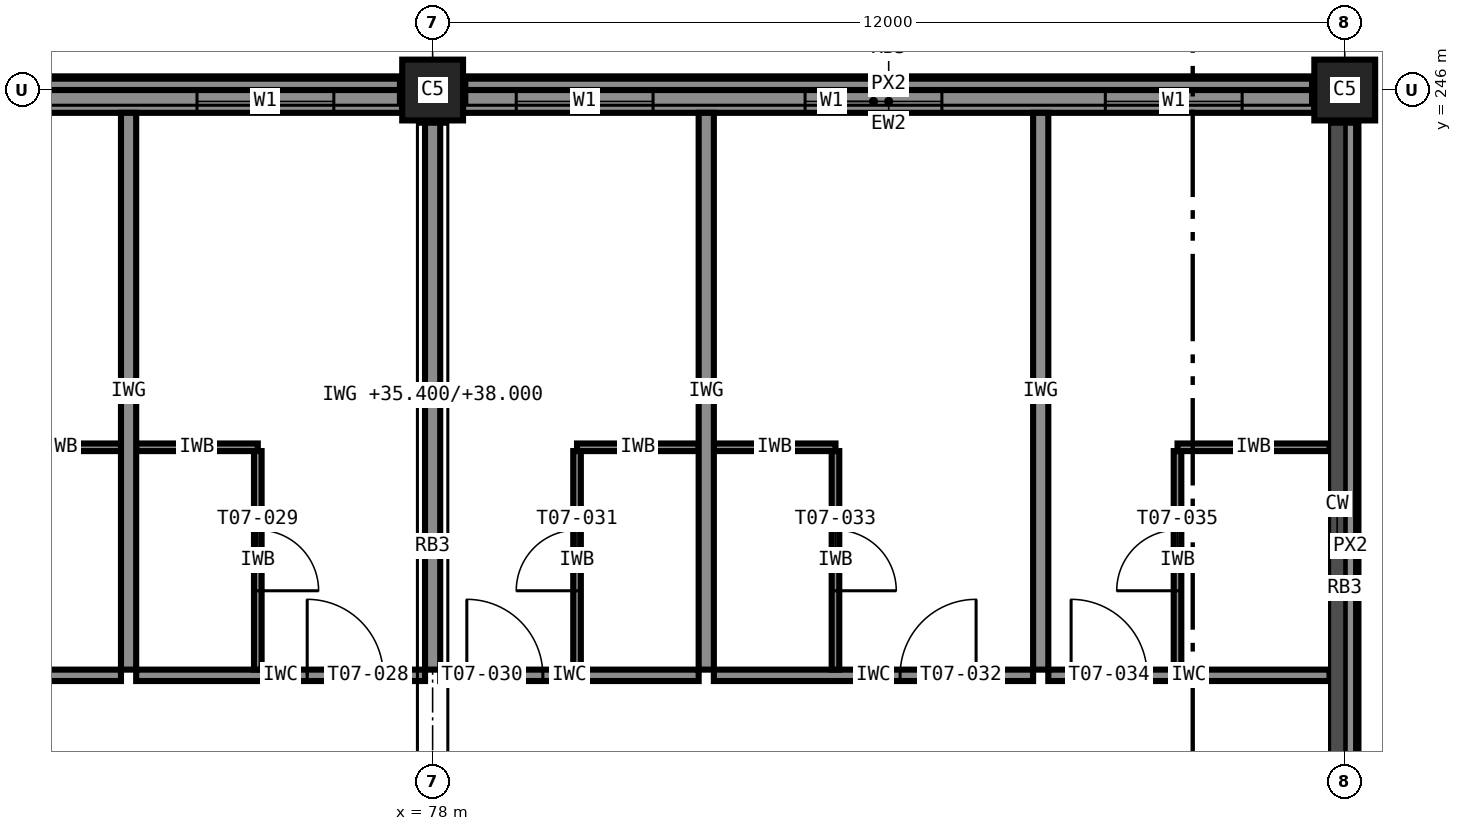
"""IFC4 building model, lengths in metres.
Left out: names, types, materials, properties, quantities, classifications, styles, units other than length and angle.
Written with IfcOpenShell. Run it as: python <this file> out.ifc"""

import sys

from ifc_helpers import new_model, si_unit, direction, frame, frame_2d, origin, origin_2d, place, context, subcontext, project, spatial, rectangle, extrude, element, fill, save


model = new_model("IFC4")
c1 = context("Model", 3, precision=1e-05, world=origin(), true_north=direction((0.0, 1.0)))
c2 = subcontext(c1, "Body", "Model", "MODEL_VIEW")
j1 = project(units=[si_unit("LENGTHUNIT", "METRE"), si_unit("PLANEANGLEUNIT", "RADIAN")], contexts=[c1])
p1 = place(None, origin())
s1 = spatial("IfcSite", under=j1, at=p1, CompositionType="ELEMENT")
p2 = place(p1, origin())
s2 = spatial("IfcBuilding", under=s1, at=p2, CompositionType="ELEMENT")
p3 = place(p2, frame((0.0, 0.0, 35.4)))
s3 = spatial("IfcBuildingStorey", under=s2, at=p3, CompositionType="ELEMENT", Elevation=35.4)
for number, where, z_axis, x_axis in (
    (1, (78.0, 246.0, 0.0), (0.0, 0.0, 1.0), (1.0, 0.0, 0.0)),
    (2, (90.0, 246.0, 0.0), (0.0, 0.0, 1.0), (1.0, 0.0, 0.0)),
):
    element("IfcColumn", number, at=place(p3, frame(where, z_axis=z_axis, x_axis=x_axis)), inside=s3, PredefinedType="COLUMN", context=c2, shape_type="SweptSolid", body=[
        extrude(rectangle(XDim=0.8, YDim=0.8, at=origin_2d()), origin(), (0.0, 0.0, 1.0), 3.6),
    ])
p4 = place(p3, frame((90.075, 234.4, 3.4), z_axis=(0.0, 0.0, 1.0), x_axis=(0.0, 1.0, 0.0)))
e3 = element("IfcWall", 3, at=p4, inside=s3, PredefinedType="STANDARD", context=c2, shape_type="SweptSolid", body=[
    extrude(rectangle(XDim=11.2, YDim=0.15, at=frame_2d((5.6, 0.0))), origin(), (0.0, 0.0, 1.0), 0.2),
])
p5 = place(p3, frame((89.6, 245.85, 0.0), z_axis=(0.0, 0.0, 1.0), x_axis=(-1.0, 0.0, 0.0)))
e4 = element("IfcWall", 4, at=p5, inside=s3, PredefinedType="STANDARD", context=c2, shape_type="SweptSolid", body=[
    extrude(rectangle(XDim=11.2, YDim=0.3, at=frame_2d((5.6, 0.0))), origin(), (0.0, 0.0, 1.0), 2.6),
])
p6 = place(p5, frame((8.7, 0.0, 0.85)))
e5 = element("IfcOpeningElement", 5, at=p6, cuts=e4, PredefinedType="OPENING", context=c2, shape_type="SweptSolid", body=[
    extrude(rectangle(XDim=1.8, YDim=1.75, at=frame_2d((0.9, 0.875))), frame((0.0, 0.16, 0.0), z_axis=(0.0, -1.0, 0.0), x_axis=(1.0, 0.0, 0.0)), (0.0, 0.0, 1.0), 0.32),
])
p7 = place(p5, frame((4.9, 0.0, 0.85)))
e6 = element("IfcOpeningElement", 6, at=p7, cuts=e4, PredefinedType="OPENING", context=c2, shape_type="SweptSolid", body=[
    extrude(rectangle(XDim=1.8, YDim=1.75, at=frame_2d((0.9, 0.875))), frame((0.0, 0.16, 0.0), z_axis=(0.0, -1.0, 0.0), x_axis=(1.0, 0.0, 0.0)), (0.0, 0.0, 1.0), 0.32),
])
p8 = place(p5, frame((0.95, 0.0, 0.85)))
e7 = element("IfcOpeningElement", 7, at=p8, cuts=e4, PredefinedType="OPENING", context=c2, shape_type="SweptSolid", body=[
    extrude(rectangle(XDim=1.8, YDim=1.75, at=frame_2d((0.9, 0.875))), frame((0.0, 0.16, 0.0), z_axis=(0.0, -1.0, 0.0), x_axis=(1.0, 0.0, 0.0)), (0.0, 0.0, 1.0), 0.32),
])
p9 = place(p3, frame((77.6, 245.85, 0.0), z_axis=(0.0, 0.0, 1.0), x_axis=(-1.0, 0.0, 0.0)))
e8 = element("IfcWall", 8, at=p9, inside=s3, PredefinedType="STANDARD", context=c2, shape_type="SweptSolid", body=[
    extrude(rectangle(XDim=11.2, YDim=0.3, at=frame_2d((5.6, 0.0))), origin(), (0.0, 0.0, 1.0), 2.6),
])
p10 = place(p9, frame((8.5, 0.0, 0.85)))
e9 = element("IfcOpeningElement", 9, at=p10, cuts=e8, PredefinedType="OPENING", context=c2, shape_type="SweptSolid", body=[
    extrude(rectangle(XDim=1.8, YDim=1.75, at=frame_2d((0.9, 0.875))), frame((0.0, 0.16, 0.0), z_axis=(0.0, -1.0, 0.0), x_axis=(1.0, 0.0, 0.0)), (0.0, 0.0, 1.0), 0.32),
])
p11 = place(p9, frame((4.7, 0.0, 0.85)))
e10 = element("IfcOpeningElement", 10, at=p11, cuts=e8, PredefinedType="OPENING", context=c2, shape_type="SweptSolid", body=[
    extrude(rectangle(XDim=1.8, YDim=1.75, at=frame_2d((0.9, 0.875))), frame((0.0, 0.16, 0.0), z_axis=(0.0, -1.0, 0.0), x_axis=(1.0, 0.0, 0.0)), (0.0, 0.0, 1.0), 0.32),
])
p12 = place(p9, frame((0.9, 0.0, 0.85)))
e11 = element("IfcOpeningElement", 11, at=p12, cuts=e8, PredefinedType="OPENING", context=c2, shape_type="SweptSolid", body=[
    extrude(rectangle(XDim=1.8, YDim=1.75, at=frame_2d((0.9, 0.875))), frame((0.0, 0.16, 0.0), z_axis=(0.0, -1.0, 0.0), x_axis=(1.0, 0.0, 0.0)), (0.0, 0.0, 1.0), 0.32),
])
for number, where, z_axis, x_axis in (
    (12, (89.6, 246.075, 3.4), (0.0, 0.0, 1.0), (-1.0, 0.0, 0.0)),
    (13, (77.6, 246.075, 3.4), (0.0, 0.0, 1.0), (-1.0, 0.0, 0.0)),
):
    element("IfcWall", number, at=place(p3, frame(where, z_axis=z_axis, x_axis=x_axis)), inside=s3, PredefinedType="STANDARD", context=c2, shape_type="SweptSolid", body=[
        extrude(rectangle(XDim=11.2, YDim=0.15, at=frame_2d((5.6, 0.0))), origin(), (0.0, 0.0, 1.0), 0.2),
    ])
p13 = place(p3, frame((70.1, 238.3, 0.0), z_axis=(0.0, 0.0, 1.0), x_axis=(1.0, 0.0, 0.0)))
e14 = element("IfcWall", 14, at=p13, inside=s3, PredefinedType="PARTITIONING", context=c2, shape_type="SweptSolid", body=[
    extrude(rectangle(XDim=3.8, YDim=0.15, at=frame_2d((1.9, 0.0))), origin(), (0.0, 0.0, 1.0), 3.4),
])
p14 = place(p13, frame((0.55, 0.0, 0.0)))
e15 = element("IfcOpeningElement", 15, at=p14, cuts=e14, PredefinedType="OPENING", context=c2, shape_type="SweptSolid", body=[
    extrude(rectangle(XDim=1.0, YDim=2.1, at=frame_2d((0.5, 1.05))), frame((0.0, 0.085, 0.0), z_axis=(0.0, -1.0, 0.0), x_axis=(1.0, 0.0, 0.0)), (0.0, 0.0, 1.0), 0.17),
])
p15 = place(p3, frame((72.3, 241.3, 0.0), z_axis=(0.0, 0.0, 1.0), x_axis=(1.0, 0.0, 0.0)))
e16 = element("IfcWall", 16, at=p15, inside=s3, PredefinedType="PARTITIONING", context=c2, shape_type="SweptSolid", body=[
    extrude(rectangle(XDim=1.6, YDim=0.1, at=frame_2d((0.8, 0.0))), origin(), (0.0, 0.0, 1.0), 3.4),
])
p16 = place(p3, frame((74.1, 238.3, 0.0), z_axis=(0.0, 0.0, 1.0), x_axis=(1.0, 0.0, 0.0)))
e17 = element("IfcWall", 17, at=p16, inside=s3, PredefinedType="PARTITIONING", context=c2, shape_type="SweptSolid", body=[
    extrude(rectangle(XDim=3.8, YDim=0.15, at=frame_2d((1.9, 0.0))), origin(), (0.0, 0.0, 1.0), 3.4),
])
p17 = place(p16, frame((2.25, 0.0, 0.0)))
e18 = element("IfcOpeningElement", 18, at=p17, cuts=e17, PredefinedType="OPENING", context=c2, shape_type="SweptSolid", body=[
    extrude(rectangle(XDim=1.0, YDim=2.1, at=frame_2d((0.5, 1.05))), frame((0.0, 0.085, 0.0), z_axis=(0.0, -1.0, 0.0), x_axis=(1.0, 0.0, 0.0)), (0.0, 0.0, 1.0), 0.17),
])
p18 = place(p3, frame((74.1, 241.3, 0.0), z_axis=(0.0, 0.0, 1.0), x_axis=(1.0, 0.0, 0.0)))
e19 = element("IfcWall", 19, at=p18, inside=s3, PredefinedType="PARTITIONING", context=c2, shape_type="SweptSolid", body=[
    extrude(rectangle(XDim=1.6, YDim=0.1, at=frame_2d((0.8, 0.0))), origin(), (0.0, 0.0, 1.0), 3.4),
])
p19 = place(p3, frame((75.7, 241.25, 0.0), z_axis=(0.0, 0.0, 1.0), x_axis=(0.0, -1.0, 0.0)))
e20 = element("IfcWall", 20, at=p19, inside=s3, PredefinedType="PARTITIONING", context=c2, shape_type="SweptSolid", body=[
    extrude(rectangle(XDim=2.875, YDim=0.1, at=frame_2d((1.438, 0.0))), origin(), (0.0, 0.0, 1.0), 3.4),
])
p20 = place(p19, frame((1.038, 0.0, 0.0)))
e21 = element("IfcOpeningElement", 21, at=p20, cuts=e20, PredefinedType="OPENING", context=c2, shape_type="SweptSolid", body=[
    extrude(rectangle(XDim=0.8, YDim=2.1, at=frame_2d((0.4, 1.05))), frame((0.0, 0.06, 0.0), z_axis=(0.0, -1.0, 0.0), x_axis=(1.0, 0.0, 0.0)), (0.0, 0.0, 1.0), 0.12),
])
p21 = place(p3, frame((78.1, 238.3, 0.0), z_axis=(0.0, 0.0, 1.0), x_axis=(1.0, 0.0, 0.0)))
e22 = element("IfcWall", 22, at=p21, inside=s3, PredefinedType="PARTITIONING", context=c2, shape_type="SweptSolid", body=[
    extrude(rectangle(XDim=3.4, YDim=0.15, at=frame_2d((1.7, 0.0))), origin(), (0.0, 0.0, 1.0), 3.4),
])
p22 = place(p21, frame((0.35, 0.0, 0.0)))
e23 = element("IfcOpeningElement", 23, at=p22, cuts=e22, PredefinedType="OPENING", context=c2, shape_type="SweptSolid", body=[
    extrude(rectangle(XDim=1.0, YDim=2.1, at=frame_2d((0.5, 1.05))), frame((0.0, 0.085, 0.0), z_axis=(0.0, -1.0, 0.0), x_axis=(1.0, 0.0, 0.0)), (0.0, 0.0, 1.0), 0.17),
])
p23 = place(p3, frame((79.9, 241.3, 0.0), z_axis=(0.0, 0.0, 1.0), x_axis=(1.0, 0.0, 0.0)))
e24 = element("IfcWall", 24, at=p23, inside=s3, PredefinedType="PARTITIONING", context=c2, shape_type="SweptSolid", body=[
    extrude(rectangle(XDim=1.6, YDim=0.1, at=frame_2d((0.8, 0.0))), origin(), (0.0, 0.0, 1.0), 3.4),
])
p24 = place(p3, frame((79.9, 238.375, 0.0), z_axis=(0.0, 0.0, 1.0), x_axis=(0.0, 1.0, 0.0)))
e25 = element("IfcWall", 25, at=p24, inside=s3, PredefinedType="PARTITIONING", context=c2, shape_type="SweptSolid", body=[
    extrude(rectangle(XDim=2.875, YDim=0.1, at=frame_2d((1.438, 0.0))), origin(), (0.0, 0.0, 1.0), 3.4),
])
p25 = place(p24, frame((1.038, 0.0, 0.0)))
e26 = element("IfcOpeningElement", 26, at=p25, cuts=e25, PredefinedType="OPENING", context=c2, shape_type="SweptSolid", body=[
    extrude(rectangle(XDim=0.8, YDim=2.1, at=frame_2d((0.4, 1.05))), frame((0.0, 0.06, 0.0), z_axis=(0.0, -1.0, 0.0), x_axis=(1.0, 0.0, 0.0)), (0.0, 0.0, 1.0), 0.12),
])
p26 = place(p3, frame((81.7, 238.3, 0.0), z_axis=(0.0, 0.0, 1.0), x_axis=(1.0, 0.0, 0.0)))
e27 = element("IfcWall", 27, at=p26, inside=s3, PredefinedType="PARTITIONING", context=c2, shape_type="SweptSolid", body=[
    extrude(rectangle(XDim=4.2, YDim=0.15, at=frame_2d((2.1, 0.0))), origin(), (0.0, 0.0, 1.0), 3.4),
])
p27 = place(p26, frame((2.45, 0.0, 0.0)))
e28 = element("IfcOpeningElement", 28, at=p27, cuts=e27, PredefinedType="OPENING", context=c2, shape_type="SweptSolid", body=[
    extrude(rectangle(XDim=1.0, YDim=2.1, at=frame_2d((0.5, 1.05))), frame((0.0, 0.085, 0.0), z_axis=(0.0, -1.0, 0.0), x_axis=(1.0, 0.0, 0.0)), (0.0, 0.0, 1.0), 0.17),
])
p28 = place(p3, frame((81.7, 241.3, 0.0), z_axis=(0.0, 0.0, 1.0), x_axis=(1.0, 0.0, 0.0)))
e29 = element("IfcWall", 29, at=p28, inside=s3, PredefinedType="PARTITIONING", context=c2, shape_type="SweptSolid", body=[
    extrude(rectangle(XDim=1.6, YDim=0.1, at=frame_2d((0.8, 0.0))), origin(), (0.0, 0.0, 1.0), 3.4),
])
p29 = place(p3, frame((83.3, 241.25, 0.0), z_axis=(0.0, 0.0, 1.0), x_axis=(0.0, -1.0, 0.0)))
e30 = element("IfcWall", 30, at=p29, inside=s3, PredefinedType="PARTITIONING", context=c2, shape_type="SweptSolid", body=[
    extrude(rectangle(XDim=2.875, YDim=0.1, at=frame_2d((1.438, 0.0))), origin(), (0.0, 0.0, 1.0), 3.4),
])
p30 = place(p29, frame((1.038, 0.0, 0.0)))
e31 = element("IfcOpeningElement", 31, at=p30, cuts=e30, PredefinedType="OPENING", context=c2, shape_type="SweptSolid", body=[
    extrude(rectangle(XDim=0.8, YDim=2.1, at=frame_2d((0.4, 1.05))), frame((0.0, 0.06, 0.0), z_axis=(0.0, -1.0, 0.0), x_axis=(1.0, 0.0, 0.0)), (0.0, 0.0, 1.0), 0.12),
])
p31 = place(p3, frame((86.1, 238.3, 0.0), z_axis=(0.0, 0.0, 1.0), x_axis=(1.0, 0.0, 0.0)))
e32 = element("IfcWall", 32, at=p31, inside=s3, PredefinedType="PARTITIONING", context=c2, shape_type="SweptSolid", body=[
    extrude(rectangle(XDim=3.7, YDim=0.15, at=frame_2d((1.85, 0.0))), origin(), (0.0, 0.0, 1.0), 3.4),
])
p32 = place(p31, frame((0.3, 0.0, 0.0)))
e33 = element("IfcOpeningElement", 33, at=p32, cuts=e32, PredefinedType="OPENING", context=c2, shape_type="SweptSolid", body=[
    extrude(rectangle(XDim=1.0, YDim=2.1, at=frame_2d((0.5, 1.05))), frame((0.0, 0.085, 0.0), z_axis=(0.0, -1.0, 0.0), x_axis=(1.0, 0.0, 0.0)), (0.0, 0.0, 1.0), 0.17),
])
p33 = place(p3, frame((87.8, 241.3, 0.0), z_axis=(0.0, 0.0, 1.0), x_axis=(1.0, 0.0, 0.0)))
e34 = element("IfcWall", 34, at=p33, inside=s3, PredefinedType="PARTITIONING", context=c2, shape_type="SweptSolid", body=[
    extrude(rectangle(XDim=2.0, YDim=0.1, at=frame_2d((1.0, 0.0))), origin(), (0.0, 0.0, 1.0), 3.4),
])
p34 = place(p3, frame((87.8, 238.375, 0.0), z_axis=(0.0, 0.0, 1.0), x_axis=(0.0, 1.0, 0.0)))
e35 = element("IfcWall", 35, at=p34, inside=s3, PredefinedType="PARTITIONING", context=c2, shape_type="SweptSolid", body=[
    extrude(rectangle(XDim=2.875, YDim=0.1, at=frame_2d((1.438, 0.0))), origin(), (0.0, 0.0, 1.0), 3.4),
])
p35 = place(p34, frame((1.038, 0.0, 0.0)))
e36 = element("IfcOpeningElement", 36, at=p35, cuts=e35, PredefinedType="OPENING", context=c2, shape_type="SweptSolid", body=[
    extrude(rectangle(XDim=0.8, YDim=2.1, at=frame_2d((0.4, 1.05))), frame((0.0, 0.06, 0.0), z_axis=(0.0, -1.0, 0.0), x_axis=(1.0, 0.0, 0.0)), (0.0, 0.0, 1.0), 0.12),
])
p36 = place(p3, frame((74.0, 245.7, 0.0), z_axis=(0.0, 0.0, 1.0), x_axis=(0.0, -1.0, 0.0)))
e37 = element("IfcWall", 37, at=p36, inside=s3, PredefinedType="PARTITIONING", context=c2, shape_type="SweptSolid", body=[
    extrude(rectangle(XDim=7.325, YDim=0.2, at=frame_2d((3.663, 0.0))), origin(), (0.0, 0.0, 1.0), 3.4),
])
p37 = place(p3, frame((78.0, 245.6, 0.0), z_axis=(0.0, 0.0, 1.0), x_axis=(0.0, -1.0, 0.0)))
e38 = element("IfcWall", 38, at=p37, inside=s3, PredefinedType="PARTITIONING", context=c2, shape_type="SweptSolid", body=[
    extrude(rectangle(XDim=7.225, YDim=0.2, at=frame_2d((3.613, 0.0))), origin(), (0.0, 0.0, 1.0), 2.6),
])
for number, where, z_axis, x_axis in (
    (39, (81.6, 245.7, 0.0), (0.0, 0.0, 1.0), (0.0, -1.0, 0.0)),
    (40, (86.0, 245.7, 0.0), (0.0, 0.0, 1.0), (0.0, -1.0, 0.0)),
):
    element("IfcWall", number, at=place(p3, frame(where, z_axis=z_axis, x_axis=x_axis)), inside=s3, PredefinedType="PARTITIONING", context=c2, shape_type="SweptSolid", body=[
        extrude(rectangle(XDim=7.325, YDim=0.2, at=frame_2d((3.663, 0.0))), origin(), (0.0, 0.0, 1.0), 3.4),
    ])
p38 = place(p6, origin())
e41 = element("IfcWindow", 41, at=p38, inside=s3, PartitioningType="SINGLE_PANEL", PredefinedType="WINDOW", context=c2, shape_type="SweptSolid", body=[
    extrude(rectangle(XDim=1.8, YDim=1.75, at=frame_2d((0.9, 0.875))), frame((0.0, 0.03, 0.0), z_axis=(0.0, -1.0, 0.0), x_axis=(1.0, 0.0, 0.0)), (0.0, 0.0, 1.0), 0.06),
])
fill(e5, e41)
p39 = place(p7, origin())
e42 = element("IfcWindow", 42, at=p39, inside=s3, PartitioningType="SINGLE_PANEL", PredefinedType="WINDOW", context=c2, shape_type="SweptSolid", body=[
    extrude(rectangle(XDim=1.8, YDim=1.75, at=frame_2d((0.9, 0.875))), frame((0.0, 0.03, 0.0), z_axis=(0.0, -1.0, 0.0), x_axis=(1.0, 0.0, 0.0)), (0.0, 0.0, 1.0), 0.06),
])
fill(e6, e42)
p40 = place(p8, origin())
e43 = element("IfcWindow", 43, at=p40, inside=s3, PartitioningType="SINGLE_PANEL", PredefinedType="WINDOW", context=c2, shape_type="SweptSolid", body=[
    extrude(rectangle(XDim=1.8, YDim=1.75, at=frame_2d((0.9, 0.875))), frame((0.0, 0.03, 0.0), z_axis=(0.0, -1.0, 0.0), x_axis=(1.0, 0.0, 0.0)), (0.0, 0.0, 1.0), 0.06),
])
fill(e7, e43)
p41 = place(p12, origin())
e44 = element("IfcWindow", 44, at=p41, inside=s3, PartitioningType="SINGLE_PANEL", PredefinedType="WINDOW", context=c2, shape_type="SweptSolid", body=[
    extrude(rectangle(XDim=1.8, YDim=1.75, at=frame_2d((0.9, 0.875))), frame((0.0, 0.03, 0.0), z_axis=(0.0, -1.0, 0.0), x_axis=(1.0, 0.0, 0.0)), (0.0, 0.0, 1.0), 0.06),
])
fill(e11, e44)
p42 = place(p17, origin())
e45 = element("IfcDoor", 45, at=p42, inside=s3, OperationType="SINGLE_SWING_LEFT", PredefinedType="DOOR", context=c2, shape_type="SweptSolid", body=[
    extrude(rectangle(XDim=1.0, YDim=2.1, at=frame_2d((0.5, 1.05))), frame((0.0, 0.025, 0.0), z_axis=(0.0, -1.0, 0.0), x_axis=(1.0, 0.0, 0.0)), (0.0, 0.0, 1.0), 0.05),
])
fill(e18, e45)
p43 = place(p20, origin())
e46 = element("IfcDoor", 46, at=p43, inside=s3, OperationType="SINGLE_SWING_RIGHT", PredefinedType="DOOR", context=c2, shape_type="SweptSolid", body=[
    extrude(rectangle(XDim=0.8, YDim=2.1, at=frame_2d((0.4, 1.05))), frame((0.0, 0.025, 0.0), z_axis=(0.0, -1.0, 0.0), x_axis=(1.0, 0.0, 0.0)), (0.0, 0.0, 1.0), 0.05),
])
fill(e21, e46)
p44 = place(p22, origin())
e47 = element("IfcDoor", 47, at=p44, inside=s3, OperationType="SINGLE_SWING_LEFT", PredefinedType="DOOR", context=c2, shape_type="SweptSolid", body=[
    extrude(rectangle(XDim=1.0, YDim=2.1, at=frame_2d((0.5, 1.05))), frame((0.0, 0.025, 0.0), z_axis=(0.0, -1.0, 0.0), x_axis=(1.0, 0.0, 0.0)), (0.0, 0.0, 1.0), 0.05),
])
fill(e23, e47)
p45 = place(p25, origin())
e48 = element("IfcDoor", 48, at=p45, inside=s3, OperationType="SINGLE_SWING_LEFT", PredefinedType="DOOR", context=c2, shape_type="SweptSolid", body=[
    extrude(rectangle(XDim=0.8, YDim=2.1, at=frame_2d((0.4, 1.05))), frame((0.0, 0.025, 0.0), z_axis=(0.0, -1.0, 0.0), x_axis=(1.0, 0.0, 0.0)), (0.0, 0.0, 1.0), 0.05),
])
fill(e26, e48)
p46 = place(p27, origin())
e49 = element("IfcDoor", 49, at=p46, inside=s3, OperationType="SINGLE_SWING_RIGHT", PredefinedType="DOOR", context=c2, shape_type="SweptSolid", body=[
    extrude(rectangle(XDim=1.0, YDim=2.1, at=frame_2d((0.5, 1.05))), frame((0.0, 0.025, 0.0), z_axis=(0.0, -1.0, 0.0), x_axis=(1.0, 0.0, 0.0)), (0.0, 0.0, 1.0), 0.05),
])
fill(e28, e49)
p47 = place(p30, origin())
e50 = element("IfcDoor", 50, at=p47, inside=s3, OperationType="SINGLE_SWING_RIGHT", PredefinedType="DOOR", context=c2, shape_type="SweptSolid", body=[
    extrude(rectangle(XDim=0.8, YDim=2.1, at=frame_2d((0.4, 1.05))), frame((0.0, 0.025, 0.0), z_axis=(0.0, -1.0, 0.0), x_axis=(1.0, 0.0, 0.0)), (0.0, 0.0, 1.0), 0.05),
])
fill(e31, e50)
p48 = place(p32, origin())
e51 = element("IfcDoor", 51, at=p48, inside=s3, OperationType="SINGLE_SWING_LEFT", PredefinedType="DOOR", context=c2, shape_type="SweptSolid", body=[
    extrude(rectangle(XDim=1.0, YDim=2.1, at=frame_2d((0.5, 1.05))), frame((0.0, 0.025, 0.0), z_axis=(0.0, -1.0, 0.0), x_axis=(1.0, 0.0, 0.0)), (0.0, 0.0, 1.0), 0.05),
])
fill(e33, e51)
p49 = place(p35, origin())
e52 = element("IfcDoor", 52, at=p49, inside=s3, OperationType="SINGLE_SWING_LEFT", PredefinedType="DOOR", context=c2, shape_type="SweptSolid", body=[
    extrude(rectangle(XDim=0.8, YDim=2.1, at=frame_2d((0.4, 1.05))), frame((0.0, 0.025, 0.0), z_axis=(0.0, -1.0, 0.0), x_axis=(1.0, 0.0, 0.0)), (0.0, 0.0, 1.0), 0.05),
])
fill(e36, e52)
save(model, sys.argv[1])
